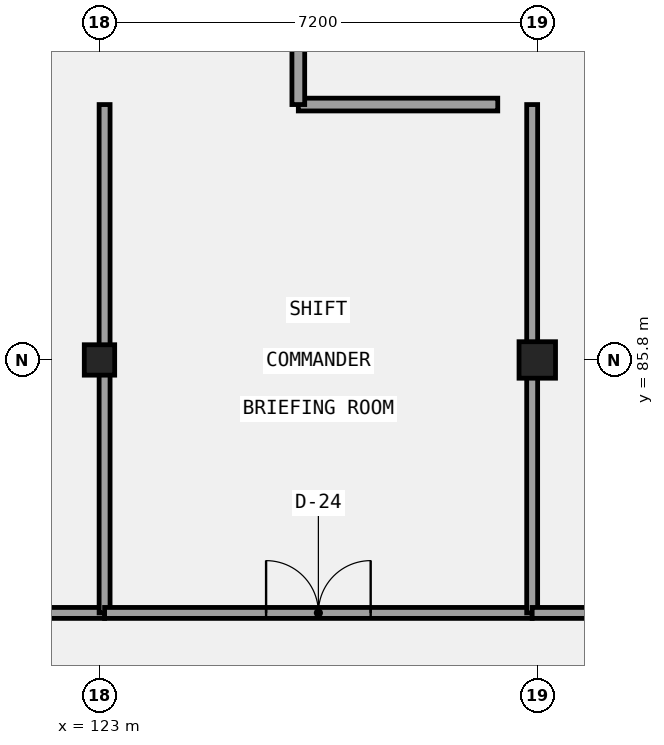
"""IFC4 building model, lengths in metres.
Left out: names, types, materials, properties, quantities, classifications, styles, units other than length and angle.
Written with IfcOpenShell. Run it as: python <this file> out.ifc"""

import sys

from ifc_helpers import new_model, si_unit, direction, frame, frame_2d, origin, origin_2d, place, context, subcontext, project, spatial, rectangle, extrude, element, fill, save


model = new_model("IFC4")
c1 = context("Model", 3, precision=1e-05, world=origin(), true_north=direction((0.0, 1.0)))
c2 = subcontext(c1, "Body", "Model", "MODEL_VIEW")
j1 = project(units=[si_unit("LENGTHUNIT", "METRE"), si_unit("PLANEANGLEUNIT", "RADIAN")], contexts=[c1])
p1 = place(None, origin())
s1 = spatial("IfcSite", under=j1, at=p1, CompositionType="ELEMENT")
p2 = place(p1, origin())
s2 = spatial("IfcBuilding", under=s1, at=p2, CompositionType="ELEMENT")
p3 = place(p2, frame((0.0, 0.0, 26.4)))
s3 = spatial("IfcBuildingStorey", under=s2, at=p3, CompositionType="ELEMENT", Elevation=26.4)
p4 = place(p3, frame((123.0, 85.8, 0.0), z_axis=(0.0, 0.0, 1.0), x_axis=(1.0, 0.0, 0.0)))
e1 = element("IfcColumn", 1, at=p4, inside=s3, PredefinedType="COLUMN", context=c2, shape_type="SweptSolid", body=[
    extrude(rectangle(XDim=0.5, YDim=0.5, at=origin_2d()), origin(), (0.0, 0.0, 1.0), 4.5),
])
p5 = place(p3, frame((130.2, 85.8, 0.0), z_axis=(0.0, 0.0, 1.0), x_axis=(1.0, 0.0, 0.0)))
e2 = element("IfcColumn", 2, at=p5, inside=s3, PredefinedType="COLUMN", context=c2, shape_type="SweptSolid", body=[
    extrude(rectangle(XDim=0.6, YDim=0.6, at=origin_2d()), origin(), (0.0, 0.0, 1.0), 4.5),
])
p6 = place(p3, frame((116.052, 81.64, 0.0), z_axis=(0.0, 0.0, 1.0), x_axis=(1.0, 0.0, 0.0)))
e3 = element("IfcWall", 3, at=p6, inside=s3, PredefinedType="PARTITIONING", context=c2, shape_type="SweptSolid", body=[
    extrude(rectangle(XDim=7.032, YDim=0.18, at=frame_2d((3.516, 0.0))), origin(), (0.0, 0.0, 1.0), 4.22),
])
p7 = place(p6, frame((2.656, 0.0, 0.0)))
e4 = element("IfcOpeningElement", 4, at=p7, cuts=e3, PredefinedType="OPENING", context=c2, shape_type="SweptSolid", body=[
    extrude(rectangle(XDim=1.72, YDim=2.22, at=frame_2d((0.86, 1.11))), frame((0.0, 0.1, 0.0), z_axis=(0.0, -1.0, 0.0), x_axis=(1.0, 0.0, 0.0)), (0.0, 0.0, 1.0), 0.2),
])
p8 = place(p3, frame((123.084, 81.64, 0.0), z_axis=(0.0, 0.0, 1.0), x_axis=(0.0, 1.0, 0.0)))
e5 = element("IfcWall", 5, at=p8, inside=s3, PredefinedType="PARTITIONING", context=c2, shape_type="SweptSolid", body=[
    extrude(rectangle(XDim=8.36, YDim=0.18, at=frame_2d((4.18, 0.0))), origin(), (0.0, 0.0, 1.0), 3.47),
])
p9 = place(p3, frame((123.084, 81.64, 0.0), z_axis=(0.0, 0.0, 1.0), x_axis=(1.0, 0.0, 0.0)))
e6 = element("IfcWall", 6, at=p9, inside=s3, PredefinedType="PARTITIONING", context=c2, shape_type="SweptSolid", body=[
    extrude(rectangle(XDim=7.032, YDim=0.18, at=frame_2d((3.516, 0.0))), origin(), (0.0, 0.0, 1.0), 4.22),
])
p10 = place(p9, frame((2.656, 0.0, 0.0)))
e7 = element("IfcOpeningElement", 7, at=p10, cuts=e6, PredefinedType="OPENING", context=c2, shape_type="SweptSolid", body=[
    extrude(rectangle(XDim=1.72, YDim=2.35, at=frame_2d((0.86, 1.175))), frame((0.0, 0.1, 0.0), z_axis=(0.0, -1.0, 0.0), x_axis=(1.0, 0.0, 0.0)), (0.0, 0.0, 1.0), 0.2),
])
p11 = place(p3, frame((130.116, 81.64, 0.0), z_axis=(0.0, 0.0, 1.0), x_axis=(0.0, 1.0, 0.0)))
e8 = element("IfcWall", 8, at=p11, inside=s3, PredefinedType="PARTITIONING", context=c2, shape_type="SweptSolid", body=[
    extrude(rectangle(XDim=8.36, YDim=0.18, at=frame_2d((4.18, 0.0))), origin(), (0.0, 0.0, 1.0), 3.42),
])
p12 = place(p3, frame((130.116, 81.64, 0.0), z_axis=(0.0, 0.0, 1.0), x_axis=(1.0, 0.0, 0.0)))
e9 = element("IfcWall", 9, at=p12, inside=s3, PredefinedType="PARTITIONING", context=c2, shape_type="SweptSolid", body=[
    extrude(rectangle(XDim=7.032, YDim=0.18, at=frame_2d((3.516, 0.0))), origin(), (0.0, 0.0, 1.0), 4.22),
])
p13 = place(p12, frame((3.056, 0.0, 0.0)))
e10 = element("IfcOpeningElement", 10, at=p13, cuts=e9, PredefinedType="OPENING", context=c2, shape_type="SweptSolid", body=[
    extrude(rectangle(XDim=0.92, YDim=2.1, at=frame_2d((0.46, 1.05))), frame((0.0, 0.1, 0.0), z_axis=(0.0, -1.0, 0.0), x_axis=(1.0, 0.0, 0.0)), (0.0, 0.0, 1.0), 0.2),
])
p14 = place(p3, frame((126.27, 90.0, 0.0), z_axis=(0.0, 0.0, 1.0), x_axis=(1.0, 0.0, 0.0)))
e11 = element("IfcWall", 11, at=p14, inside=s3, PredefinedType="PARTITIONING", context=c2, shape_type="SweptSolid", body=[
    extrude(rectangle(XDim=3.28, YDim=0.21, at=frame_2d((1.64, 0.0))), origin(), (0.0, 0.0, 1.0), 4.22),
])
p15 = place(p3, frame((126.27, 90.0, 0.0), z_axis=(0.0, 0.0, 1.0), x_axis=(0.0, 1.0, 0.0)))
e12 = element("IfcWall", 12, at=p15, inside=s3, PredefinedType="PARTITIONING", context=c2, shape_type="SweptSolid", body=[
    extrude(rectangle(XDim=10.85, YDim=0.21, at=frame_2d((5.425, 0.0))), origin(), (0.0, 0.0, 1.0), 4.22),
])
p16 = place(p15, frame((4.965, 0.0, 0.0)))
e13 = element("IfcOpeningElement", 13, at=p16, cuts=e12, PredefinedType="OPENING", context=c2, shape_type="SweptSolid", body=[
    extrude(rectangle(XDim=0.92, YDim=2.35, at=frame_2d((0.46, 1.175))), frame((0.0, 0.115, 0.0), z_axis=(0.0, -1.0, 0.0), x_axis=(1.0, 0.0, 0.0)), (0.0, 0.0, 1.0), 0.23),
])
p17 = place(p10, origin())
e14 = element("IfcDoor", 14, at=p17, inside=s3, OperationType="DOUBLE_DOOR_SINGLE_SWING", PredefinedType="DOOR", context=c2, shape_type="SweptSolid", body=[
    extrude(rectangle(XDim=1.72, YDim=2.35, at=frame_2d((0.86, 1.175))), frame((0.0, 0.025, 0.0), z_axis=(0.0, -1.0, 0.0), x_axis=(1.0, 0.0, 0.0)), (0.0, 0.0, 1.0), 0.05),
])
fill(e7, e14)
save(model, sys.argv[1])
